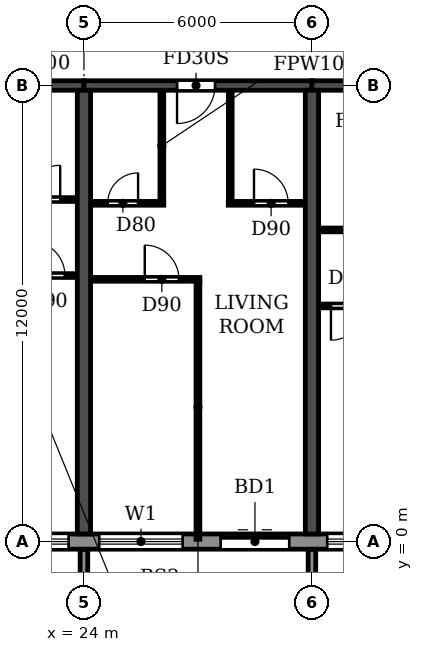
"""IFC4 building model, lengths in metres.
Left out: names, types, materials, properties, quantities, classifications, styles, units other than length and angle.
Written with IfcOpenShell. Run it as: python <this file> out.ifc"""

import sys

from ifc_helpers import new_model, si_unit, direction, frame, frame_2d, origin, place, context, subcontext, project, spatial, polyline, rectangle, outline, extrude, source, transform, mapped, element, fill, save


model = new_model("IFC4")
c1 = context("Model", 3, precision=1e-05, world=origin(), true_north=direction((0.0, 1.0)))
c2 = subcontext(c1, "Body", "Model", "MODEL_VIEW")
j1 = project(units=[si_unit("LENGTHUNIT", "METRE"), si_unit("PLANEANGLEUNIT", "RADIAN")], contexts=[c1])
p1 = place(None, origin())
s1 = spatial("IfcSite", under=j1, at=p1, CompositionType="ELEMENT")
p2 = place(p1, origin())
s2 = spatial("IfcBuilding", under=s1, at=p2, CompositionType="ELEMENT")
p3 = place(p2, frame((0.0, 0.0, 72.9)))
s3 = spatial("IfcBuildingStorey", under=s2, at=p3, CompositionType="ELEMENT", Elevation=72.9)
for number, where, z_axis, x_axis in (
    (1, (24.0, 0.2, 0.0), (0.0, 0.0, 1.0), (0.0, 1.0, 0.0)),
    (2, (30.0, 0.2, 0.0), (0.0, 0.0, 1.0), (0.0, 1.0, 0.0)),
):
    element("IfcWall", number, at=place(p3, frame(where, z_axis=z_axis, x_axis=x_axis)), inside=s3, PredefinedType="SHEAR", context=c2, shape_type="SweptSolid", body=[
        extrude(rectangle(XDim=11.675, YDim=0.35, at=frame_2d((5.837, 0.0))), origin(), (0.0, 0.0, 1.0), 3.06),
    ])
p4 = place(p3, frame((18.0, 12.0, 0.0), z_axis=(0.0, 0.0, 1.0), x_axis=(1.0, 0.0, 0.0)))
e3 = element("IfcWall", 3, at=p4, inside=s3, PredefinedType="SHEAR", context=c2, shape_type="SweptSolid", body=[
    extrude(rectangle(XDim=6.0, YDim=0.25, at=frame_2d((3.0, 0.0))), origin(), (0.0, 0.0, 1.0), 2.46),
])
p5 = place(p4, frame((2.45, 0.0, 0.0)))
e4 = element("IfcOpeningElement", 4, at=p5, cuts=e3, PredefinedType="OPENING", context=c2, shape_type="SweptSolid", body=[
    extrude(rectangle(XDim=1.0, YDim=2.1, at=frame_2d((0.5, 1.05))), frame((0.0, 0.135, 0.0), z_axis=(0.0, -1.0, 0.0), x_axis=(1.0, 0.0, 0.0)), (0.0, 0.0, 1.0), 0.27),
])
p6 = place(p3, frame((24.0, 12.0, 0.0), z_axis=(0.0, 0.0, 1.0), x_axis=(1.0, 0.0, 0.0)))
e5 = element("IfcWall", 5, at=p6, inside=s3, PredefinedType="SHEAR", context=c2, shape_type="SweptSolid", body=[
    extrude(rectangle(XDim=6.0, YDim=0.25, at=frame_2d((3.0, 0.0))), origin(), (0.0, 0.0, 1.0), 2.46),
])
p7 = place(p6, frame((2.45, 0.0, 0.0)))
e6 = element("IfcOpeningElement", 6, at=p7, cuts=e5, PredefinedType="OPENING", context=c2, shape_type="SweptSolid", body=[
    extrude(rectangle(XDim=1.0, YDim=2.1, at=frame_2d((0.5, 1.05))), frame((0.0, 0.135, 0.0), z_axis=(0.0, -1.0, 0.0), x_axis=(1.0, 0.0, 0.0)), (0.0, 0.0, 1.0), 0.27),
])
p8 = place(p3, frame((30.0, 12.0, 0.0), z_axis=(0.0, 0.0, 1.0), x_axis=(1.0, 0.0, 0.0)))
e7 = element("IfcWall", 7, at=p8, inside=s3, PredefinedType="SHEAR", context=c2, shape_type="SweptSolid", body=[
    extrude(rectangle(XDim=6.0, YDim=0.25, at=frame_2d((3.0, 0.0))), origin(), (0.0, 0.0, 1.0), 2.46),
])
p9 = place(p3, frame((10.683, 0.0, 0.0), z_axis=(0.0, 0.0, 1.0), x_axis=(1.0, 0.0, 0.0)))
e8 = element("IfcWall", 8, at=p9, inside=s3, PredefinedType="STANDARD", context=c2, shape_type="SweptSolid", body=[
    extrude(rectangle(XDim=80.634, YDim=0.4, at=frame_2d((40.317, 0.0))), origin(), (0.0, 0.0, 1.0), 3.06),
])
p10 = place(p9, frame((1.717, 0.0, 0.9)))
e9 = element("IfcOpeningElement", 9, at=p10, cuts=e8, PredefinedType="OPENING", context=c2, shape_type="SweptSolid", body=[
    extrude(rectangle(XDim=2.2, YDim=1.5, at=frame_2d((1.1, 0.75))), frame((0.0, 0.21, 0.0), z_axis=(0.0, -1.0, 0.0), x_axis=(1.0, 0.0, 0.0)), (0.0, 0.0, 1.0), 0.42),
])
p11 = place(p9, frame((4.917, 0.0, 0.0)))
e10 = element("IfcOpeningElement", 10, at=p11, cuts=e8, PredefinedType="OPENING", context=c2, shape_type="SweptSolid", body=[
    extrude(rectangle(XDim=1.8, YDim=2.4, at=frame_2d((0.9, 1.2))), frame((0.0, 0.21, 0.0), z_axis=(0.0, -1.0, 0.0), x_axis=(1.0, 0.0, 0.0)), (0.0, 0.0, 1.0), 0.42),
])
p12 = place(p9, frame((7.717, 0.0, 0.9)))
e11 = element("IfcOpeningElement", 11, at=p12, cuts=e8, PredefinedType="OPENING", context=c2, shape_type="SweptSolid", body=[
    extrude(rectangle(XDim=2.2, YDim=1.5, at=frame_2d((1.1, 0.75))), frame((0.0, 0.21, 0.0), z_axis=(0.0, -1.0, 0.0), x_axis=(1.0, 0.0, 0.0)), (0.0, 0.0, 1.0), 0.42),
])
p13 = place(p9, frame((10.717, 0.0, 0.9)))
e12 = element("IfcOpeningElement", 12, at=p13, cuts=e8, PredefinedType="OPENING", context=c2, shape_type="SweptSolid", body=[
    extrude(rectangle(XDim=2.2, YDim=1.5, at=frame_2d((1.1, 0.75))), frame((0.0, 0.21, 0.0), z_axis=(0.0, -1.0, 0.0), x_axis=(1.0, 0.0, 0.0)), (0.0, 0.0, 1.0), 0.42),
])
p14 = place(p9, frame((13.717, 0.0, 0.9)))
e13 = element("IfcOpeningElement", 13, at=p14, cuts=e8, PredefinedType="OPENING", context=c2, shape_type="SweptSolid", body=[
    extrude(rectangle(XDim=2.2, YDim=1.5, at=frame_2d((1.1, 0.75))), frame((0.0, 0.21, 0.0), z_axis=(0.0, -1.0, 0.0), x_axis=(1.0, 0.0, 0.0)), (0.0, 0.0, 1.0), 0.42),
])
p15 = place(p9, frame((16.917, 0.0, 0.0)))
e14 = element("IfcOpeningElement", 14, at=p15, cuts=e8, PredefinedType="OPENING", context=c2, shape_type="SweptSolid", body=[
    extrude(rectangle(XDim=1.8, YDim=2.4, at=frame_2d((0.9, 1.2))), frame((0.0, 0.21, 0.0), z_axis=(0.0, -1.0, 0.0), x_axis=(1.0, 0.0, 0.0)), (0.0, 0.0, 1.0), 0.42),
])
p16 = place(p9, frame((19.717, 0.0, 0.9)))
e15 = element("IfcOpeningElement", 15, at=p16, cuts=e8, PredefinedType="OPENING", context=c2, shape_type="SweptSolid", body=[
    extrude(rectangle(XDim=2.2, YDim=1.5, at=frame_2d((1.1, 0.75))), frame((0.0, 0.21, 0.0), z_axis=(0.0, -1.0, 0.0), x_axis=(1.0, 0.0, 0.0)), (0.0, 0.0, 1.0), 0.42),
])
p17 = place(p9, frame((22.717, 0.0, 0.9)))
e16 = element("IfcOpeningElement", 16, at=p17, cuts=e8, PredefinedType="OPENING", context=c2, shape_type="SweptSolid", body=[
    extrude(rectangle(XDim=2.2, YDim=1.5, at=frame_2d((1.1, 0.75))), frame((0.0, 0.21, 0.0), z_axis=(0.0, -1.0, 0.0), x_axis=(1.0, 0.0, 0.0)), (0.0, 0.0, 1.0), 0.42),
])
p18 = place(p9, frame((25.917, 0.0, 0.0)))
e17 = element("IfcOpeningElement", 17, at=p18, cuts=e8, PredefinedType="OPENING", context=c2, shape_type="SweptSolid", body=[
    extrude(rectangle(XDim=1.8, YDim=2.4, at=frame_2d((0.9, 1.2))), frame((0.0, 0.21, 0.0), z_axis=(0.0, -1.0, 0.0), x_axis=(1.0, 0.0, 0.0)), (0.0, 0.0, 1.0), 0.42),
])
p19 = place(p9, frame((28.717, 0.0, 0.9)))
e18 = element("IfcOpeningElement", 18, at=p19, cuts=e8, PredefinedType="OPENING", context=c2, shape_type="SweptSolid", body=[
    extrude(rectangle(XDim=2.2, YDim=1.5, at=frame_2d((1.1, 0.75))), frame((0.0, 0.21, 0.0), z_axis=(0.0, -1.0, 0.0), x_axis=(1.0, 0.0, 0.0)), (0.0, 0.0, 1.0), 0.42),
])
p20 = place(p9, frame((31.717, 0.0, 0.9)))
e19 = element("IfcOpeningElement", 19, at=p20, cuts=e8, PredefinedType="OPENING", context=c2, shape_type="SweptSolid", body=[
    extrude(rectangle(XDim=2.2, YDim=1.5, at=frame_2d((1.1, 0.75))), frame((0.0, 0.21, 0.0), z_axis=(0.0, -1.0, 0.0), x_axis=(1.0, 0.0, 0.0)), (0.0, 0.0, 1.0), 0.42),
])
p21 = place(p9, frame((34.717, 0.0, 0.9)))
e20 = element("IfcOpeningElement", 20, at=p21, cuts=e8, PredefinedType="OPENING", context=c2, shape_type="SweptSolid", body=[
    extrude(rectangle(XDim=2.2, YDim=1.5, at=frame_2d((1.1, 0.75))), frame((0.0, 0.21, 0.0), z_axis=(0.0, -1.0, 0.0), x_axis=(1.0, 0.0, 0.0)), (0.0, 0.0, 1.0), 0.42),
])
p22 = place(p9, frame((37.917, 0.0, 0.0)))
e21 = element("IfcOpeningElement", 21, at=p22, cuts=e8, PredefinedType="OPENING", context=c2, shape_type="SweptSolid", body=[
    extrude(rectangle(XDim=1.8, YDim=2.4, at=frame_2d((0.9, 1.2))), frame((0.0, 0.21, 0.0), z_axis=(0.0, -1.0, 0.0), x_axis=(1.0, 0.0, 0.0)), (0.0, 0.0, 1.0), 0.42),
])
p23 = place(p9, frame((40.717, 0.0, 0.9)))
e22 = element("IfcOpeningElement", 22, at=p23, cuts=e8, PredefinedType="OPENING", context=c2, shape_type="SweptSolid", body=[
    extrude(rectangle(XDim=2.2, YDim=1.5, at=frame_2d((1.1, 0.75))), frame((0.0, 0.21, 0.0), z_axis=(0.0, -1.0, 0.0), x_axis=(1.0, 0.0, 0.0)), (0.0, 0.0, 1.0), 0.42),
])
p24 = place(p9, frame((43.717, 0.0, 0.9)))
e23 = element("IfcOpeningElement", 23, at=p24, cuts=e8, PredefinedType="OPENING", context=c2, shape_type="SweptSolid", body=[
    extrude(rectangle(XDim=2.2, YDim=1.5, at=frame_2d((1.1, 0.75))), frame((0.0, 0.21, 0.0), z_axis=(0.0, -1.0, 0.0), x_axis=(1.0, 0.0, 0.0)), (0.0, 0.0, 1.0), 0.42),
])
p25 = place(p9, frame((46.717, 0.0, 0.9)))
e24 = element("IfcOpeningElement", 24, at=p25, cuts=e8, PredefinedType="OPENING", context=c2, shape_type="SweptSolid", body=[
    extrude(rectangle(XDim=2.2, YDim=1.5, at=frame_2d((1.1, 0.75))), frame((0.0, 0.21, 0.0), z_axis=(0.0, -1.0, 0.0), x_axis=(1.0, 0.0, 0.0)), (0.0, 0.0, 1.0), 0.42),
])
p26 = place(p9, frame((49.917, 0.0, 0.0)))
e25 = element("IfcOpeningElement", 25, at=p26, cuts=e8, PredefinedType="OPENING", context=c2, shape_type="SweptSolid", body=[
    extrude(rectangle(XDim=1.8, YDim=2.4, at=frame_2d((0.9, 1.2))), frame((0.0, 0.21, 0.0), z_axis=(0.0, -1.0, 0.0), x_axis=(1.0, 0.0, 0.0)), (0.0, 0.0, 1.0), 0.42),
])
p27 = place(p9, frame((52.717, 0.0, 0.9)))
e26 = element("IfcOpeningElement", 26, at=p27, cuts=e8, PredefinedType="OPENING", context=c2, shape_type="SweptSolid", body=[
    extrude(rectangle(XDim=2.2, YDim=1.5, at=frame_2d((1.1, 0.75))), frame((0.0, 0.21, 0.0), z_axis=(0.0, -1.0, 0.0), x_axis=(1.0, 0.0, 0.0)), (0.0, 0.0, 1.0), 0.42),
])
p28 = place(p9, frame((55.717, 0.0, 0.9)))
e27 = element("IfcOpeningElement", 27, at=p28, cuts=e8, PredefinedType="OPENING", context=c2, shape_type="SweptSolid", body=[
    extrude(rectangle(XDim=2.2, YDim=1.5, at=frame_2d((1.1, 0.75))), frame((0.0, 0.21, 0.0), z_axis=(0.0, -1.0, 0.0), x_axis=(1.0, 0.0, 0.0)), (0.0, 0.0, 1.0), 0.42),
])
p29 = place(p9, frame((58.717, 0.0, 0.9)))
e28 = element("IfcOpeningElement", 28, at=p29, cuts=e8, PredefinedType="OPENING", context=c2, shape_type="SweptSolid", body=[
    extrude(rectangle(XDim=2.2, YDim=1.5, at=frame_2d((1.1, 0.75))), frame((0.0, 0.21, 0.0), z_axis=(0.0, -1.0, 0.0), x_axis=(1.0, 0.0, 0.0)), (0.0, 0.0, 1.0), 0.42),
])
p30 = place(p9, frame((61.717, 0.0, 0.9)))
e29 = element("IfcOpeningElement", 29, at=p30, cuts=e8, PredefinedType="OPENING", context=c2, shape_type="SweptSolid", body=[
    extrude(rectangle(XDim=2.2, YDim=1.5, at=frame_2d((1.1, 0.75))), frame((0.0, 0.21, 0.0), z_axis=(0.0, -1.0, 0.0), x_axis=(1.0, 0.0, 0.0)), (0.0, 0.0, 1.0), 0.42),
])
p31 = place(p9, frame((64.917, 0.0, 0.0)))
e30 = element("IfcOpeningElement", 30, at=p31, cuts=e8, PredefinedType="OPENING", context=c2, shape_type="SweptSolid", body=[
    extrude(rectangle(XDim=1.8, YDim=2.4, at=frame_2d((0.9, 1.2))), frame((0.0, 0.21, 0.0), z_axis=(0.0, -1.0, 0.0), x_axis=(1.0, 0.0, 0.0)), (0.0, 0.0, 1.0), 0.42),
])
p32 = place(p9, frame((67.717, 0.0, 0.9)))
e31 = element("IfcOpeningElement", 31, at=p32, cuts=e8, PredefinedType="OPENING", context=c2, shape_type="SweptSolid", body=[
    extrude(rectangle(XDim=2.2, YDim=1.5, at=frame_2d((1.1, 0.75))), frame((0.0, 0.21, 0.0), z_axis=(0.0, -1.0, 0.0), x_axis=(1.0, 0.0, 0.0)), (0.0, 0.0, 1.0), 0.42),
])
p33 = place(p9, frame((70.717, 0.0, 0.9)))
e32 = element("IfcOpeningElement", 32, at=p33, cuts=e8, PredefinedType="OPENING", context=c2, shape_type="SweptSolid", body=[
    extrude(rectangle(XDim=2.2, YDim=1.5, at=frame_2d((1.1, 0.75))), frame((0.0, 0.21, 0.0), z_axis=(0.0, -1.0, 0.0), x_axis=(1.0, 0.0, 0.0)), (0.0, 0.0, 1.0), 0.42),
])
p34 = place(p9, frame((73.917, 0.0, 0.0)))
e33 = element("IfcOpeningElement", 33, at=p34, cuts=e8, PredefinedType="OPENING", context=c2, shape_type="SweptSolid", body=[
    extrude(rectangle(XDim=1.8, YDim=2.4, at=frame_2d((0.9, 1.2))), frame((0.0, 0.21, 0.0), z_axis=(0.0, -1.0, 0.0), x_axis=(1.0, 0.0, 0.0)), (0.0, 0.0, 1.0), 0.42),
])
p35 = place(p9, frame((76.717, 0.0, 0.9)))
e34 = element("IfcOpeningElement", 34, at=p35, cuts=e8, PredefinedType="OPENING", context=c2, shape_type="SweptSolid", body=[
    extrude(rectangle(XDim=2.2, YDim=1.5, at=frame_2d((1.1, 0.75))), frame((0.0, 0.21, 0.0), z_axis=(0.0, -1.0, 0.0), x_axis=(1.0, 0.0, 0.0)), (0.0, 0.0, 1.0), 0.42),
])
m1 = source(origin(), c2, "Body", "SweptSolid", [
    extrude(outline(polyline([(0.0, 0.0), (0.2, 0.0), (0.2, 1.65), (0.0, 1.65), (0.0, 0.0)])), origin(), (0.0, 0.0, 1.0), 3.1),
])
for number, where in (
    (35, (23.9, -1.85, 0.0)),
    (36, (29.9, -1.85, 0.0)),
):
    element("IfcWall", number, at=place(p3, frame(where)), inside=s3, PredefinedType="STANDARD", context=c2, shape_type="MappedRepresentation", body=[
        mapped(m1, transform((0.0, 0.0, 0.0))),
    ])
p36 = place(p3, frame((30.185, 6.2, 0.0), z_axis=(0.0, 0.0, 1.0), x_axis=(1.0, 0.0, 0.0)))
e37 = element("IfcWall", 37, at=p36, inside=s3, PredefinedType="PARTITIONING", context=c2, shape_type="SweptSolid", body=[
    extrude(rectangle(XDim=5.63, YDim=0.1, at=frame_2d((2.815, 0.0))), origin(), (0.0, 0.0, 1.0), 3.06),
])
p37 = place(p36, frame((0.315, 0.0, 0.0)))
e38 = element("IfcOpeningElement", 38, at=p37, cuts=e37, PredefinedType="OPENING", context=c2, shape_type="SweptSolid", body=[
    extrude(rectangle(XDim=0.9, YDim=2.1, at=frame_2d((0.45, 1.05))), frame((0.0, 0.06, 0.0), z_axis=(0.0, -1.0, 0.0), x_axis=(1.0, 0.0, 0.0)), (0.0, 0.0, 1.0), 0.12),
])
p38 = place(p36, frame((4.415, 0.0, 0.0)))
e39 = element("IfcOpeningElement", 39, at=p38, cuts=e37, PredefinedType="OPENING", context=c2, shape_type="SweptSolid", body=[
    extrude(rectangle(XDim=0.9, YDim=2.1, at=frame_2d((0.45, 1.05))), frame((0.0, 0.06, 0.0), z_axis=(0.0, -1.0, 0.0), x_axis=(1.0, 0.0, 0.0)), (0.0, 0.0, 1.0), 0.12),
])
p39 = place(p3, frame((24.185, 6.9, 0.0), z_axis=(0.0, 0.0, 1.0), x_axis=(1.0, 0.0, 0.0)))
e40 = element("IfcWall", 40, at=p39, inside=s3, PredefinedType="PARTITIONING", context=c2, shape_type="SweptSolid", body=[
    extrude(rectangle(XDim=2.865, YDim=0.1, at=frame_2d((1.433, 0.0))), origin(), (0.0, 0.0, 1.0), 3.06),
])
p40 = place(p39, frame((1.415, 0.0, 0.0)))
e41 = element("IfcOpeningElement", 41, at=p40, cuts=e40, PredefinedType="OPENING", context=c2, shape_type="SweptSolid", body=[
    extrude(rectangle(XDim=0.9, YDim=2.1, at=frame_2d((0.45, 1.05))), frame((0.0, 0.06, 0.0), z_axis=(0.0, -1.0, 0.0), x_axis=(1.0, 0.0, 0.0)), (0.0, 0.0, 1.0), 0.12),
])
p41 = place(p3, frame((20.95, 7.0, 0.0), z_axis=(0.0, 0.0, 1.0), x_axis=(1.0, 0.0, 0.0)))
e42 = element("IfcWall", 42, at=p41, inside=s3, PredefinedType="PARTITIONING", context=c2, shape_type="SweptSolid", body=[
    extrude(rectangle(XDim=2.865, YDim=0.1, at=frame_2d((1.433, 0.0))), origin(), (0.0, 0.0, 1.0), 3.06),
])
p42 = place(p41, frame((1.65, 0.0, 0.0)))
e43 = element("IfcOpeningElement", 43, at=p42, cuts=e42, PredefinedType="OPENING", context=c2, shape_type="SweptSolid", body=[
    extrude(rectangle(XDim=0.9, YDim=2.1, at=frame_2d((0.45, 1.05))), frame((0.0, 0.06, 0.0), z_axis=(0.0, -1.0, 0.0), x_axis=(1.0, 0.0, 0.0)), (0.0, 0.0, 1.0), 0.12),
])
p43 = place(p3, frame((30.185, 8.2, 0.0), z_axis=(0.0, 0.0, 1.0), x_axis=(1.0, 0.0, 0.0)))
e44 = element("IfcWall", 44, at=p43, inside=s3, PredefinedType="PARTITIONING", context=c2, shape_type="SweptSolid", body=[
    extrude(rectangle(XDim=3.165, YDim=0.1, at=frame_2d((1.583, 0.0))), origin(), (0.0, 0.0, 1.0), 3.06),
])
p44 = place(p43, frame((1.065, 0.0, 0.0)))
e45 = element("IfcOpeningElement", 45, at=p44, cuts=e44, PredefinedType="OPENING", context=c2, shape_type="SweptSolid", body=[
    extrude(rectangle(XDim=0.8, YDim=2.1, at=frame_2d((0.4, 1.05))), frame((0.0, 0.06, 0.0), z_axis=(0.0, -1.0, 0.0), x_axis=(1.0, 0.0, 0.0)), (0.0, 0.0, 1.0), 0.12),
])
p45 = place(p3, frame((24.185, 8.9, 0.0), z_axis=(0.0, 0.0, 1.0), x_axis=(1.0, 0.0, 0.0)))
e46 = element("IfcWall", 46, at=p45, inside=s3, PredefinedType="PARTITIONING", context=c2, shape_type="SweptSolid", body=[
    extrude(rectangle(XDim=1.915, YDim=0.1, at=frame_2d((0.958, 0.0))), origin(), (0.0, 0.0, 1.0), 3.06),
])
p46 = place(p45, frame((0.44, 0.0, 0.0)))
e47 = element("IfcOpeningElement", 47, at=p46, cuts=e46, PredefinedType="OPENING", context=c2, shape_type="SweptSolid", body=[
    extrude(rectangle(XDim=0.8, YDim=2.1, at=frame_2d((0.4, 1.05))), frame((0.0, 0.06, 0.0), z_axis=(0.0, -1.0, 0.0), x_axis=(1.0, 0.0, 0.0)), (0.0, 0.0, 1.0), 0.12),
])
p47 = place(p3, frame((27.8, 8.9, 0.0), z_axis=(0.0, 0.0, 1.0), x_axis=(1.0, 0.0, 0.0)))
e48 = element("IfcWall", 48, at=p47, inside=s3, PredefinedType="PARTITIONING", context=c2, shape_type="SweptSolid", body=[
    extrude(rectangle(XDim=2.015, YDim=0.1, at=frame_2d((1.007, 0.0))), origin(), (0.0, 0.0, 1.0), 3.06),
])
p48 = place(p47, frame((0.675, 0.0, 0.0)))
e49 = element("IfcOpeningElement", 49, at=p48, cuts=e48, PredefinedType="OPENING", context=c2, shape_type="SweptSolid", body=[
    extrude(rectangle(XDim=0.9, YDim=2.1, at=frame_2d((0.45, 1.05))), frame((0.0, 0.06, 0.0), z_axis=(0.0, -1.0, 0.0), x_axis=(1.0, 0.0, 0.0)), (0.0, 0.0, 1.0), 0.12),
])
p49 = place(p3, frame((21.8, 9.0, 0.0), z_axis=(0.0, 0.0, 1.0), x_axis=(1.0, 0.0, 0.0)))
e50 = element("IfcWall", 50, at=p49, inside=s3, PredefinedType="PARTITIONING", context=c2, shape_type="SweptSolid", body=[
    extrude(rectangle(XDim=2.015, YDim=0.1, at=frame_2d((1.007, 0.0))), origin(), (0.0, 0.0, 1.0), 3.06),
])
p50 = place(p49, frame((0.675, 0.0, 0.0)))
e51 = element("IfcOpeningElement", 51, at=p50, cuts=e50, PredefinedType="OPENING", context=c2, shape_type="SweptSolid", body=[
    extrude(rectangle(XDim=0.9, YDim=2.1, at=frame_2d((0.45, 1.05))), frame((0.0, 0.06, 0.0), z_axis=(0.0, -1.0, 0.0), x_axis=(1.0, 0.0, 0.0)), (0.0, 0.0, 1.0), 0.12),
])
p51 = place(p3, frame((26.05, 8.95, 0.0), z_axis=(0.0, 0.0, 1.0), x_axis=(0.0, 1.0, 0.0)))
e52 = element("IfcWall", 52, at=p51, inside=s3, PredefinedType="PARTITIONING", context=c2, shape_type="SweptSolid", body=[
    extrude(rectangle(XDim=2.915, YDim=0.1, at=frame_2d((1.458, 0.0))), origin(), (0.0, 0.0, 1.0), 3.06),
])
p52 = place(p3, frame((27.0, 0.06, 0.0), z_axis=(0.0, 0.0, 1.0), x_axis=(0.0, 1.0, 0.0)))
e53 = element("IfcWall", 53, at=p52, inside=s3, PredefinedType="PARTITIONING", context=c2, shape_type="SweptSolid", body=[
    extrude(rectangle(XDim=6.79, YDim=0.1, at=frame_2d((3.395, 0.0))), origin(), (0.0, 0.0, 1.0), 3.06),
])
p53 = place(p3, frame((27.85, 8.95, 0.0), z_axis=(0.0, 0.0, 1.0), x_axis=(0.0, 1.0, 0.0)))
e54 = element("IfcWall", 54, at=p53, inside=s3, PredefinedType="PARTITIONING", context=c2, shape_type="SweptSolid", body=[
    extrude(rectangle(XDim=2.915, YDim=0.1, at=frame_2d((1.458, 0.0))), origin(), (0.0, 0.0, 1.0), 3.06),
])
p54 = place(p13, origin())
e55 = element("IfcWindow", 55, at=p54, inside=s3, PartitioningType="DOUBLE_PANEL_HORIZONTAL", PredefinedType="WINDOW", context=c2, shape_type="SweptSolid", body=[
    extrude(rectangle(XDim=2.2, YDim=1.5, at=frame_2d((1.1, 0.75))), frame((0.0, 0.03, 0.0), z_axis=(0.0, -1.0, 0.0), x_axis=(1.0, 0.0, 0.0)), (0.0, 0.0, 1.0), 0.06),
])
fill(e12, e55)
p55 = place(p14, origin())
e56 = element("IfcWindow", 56, at=p55, inside=s3, PartitioningType="DOUBLE_PANEL_HORIZONTAL", PredefinedType="WINDOW", context=c2, shape_type="SweptSolid", body=[
    extrude(rectangle(XDim=2.2, YDim=1.5, at=frame_2d((1.1, 0.75))), frame((0.0, 0.03, 0.0), z_axis=(0.0, -1.0, 0.0), x_axis=(1.0, 0.0, 0.0)), (0.0, 0.0, 1.0), 0.06),
])
fill(e13, e56)
p56 = place(p15, origin())
e57 = element("IfcDoor", 57, at=p56, inside=s3, OperationType="DOUBLE_DOOR_SLIDING", PredefinedType="DOOR", context=c2, shape_type="SweptSolid", body=[
    extrude(rectangle(XDim=1.8, YDim=2.4, at=frame_2d((0.9, 1.2))), frame((0.0, 0.025, 0.0), z_axis=(0.0, -1.0, 0.0), x_axis=(1.0, 0.0, 0.0)), (0.0, 0.0, 1.0), 0.05),
])
fill(e14, e57)
p57 = place(p16, origin())
e58 = element("IfcWindow", 58, at=p57, inside=s3, PartitioningType="DOUBLE_PANEL_HORIZONTAL", PredefinedType="WINDOW", context=c2, shape_type="SweptSolid", body=[
    extrude(rectangle(XDim=2.2, YDim=1.5, at=frame_2d((1.1, 0.75))), frame((0.0, 0.03, 0.0), z_axis=(0.0, -1.0, 0.0), x_axis=(1.0, 0.0, 0.0)), (0.0, 0.0, 1.0), 0.06),
])
fill(e15, e58)
p58 = place(p50, origin())
e59 = element("IfcDoor", 59, at=p58, inside=s3, OperationType="SINGLE_SWING_RIGHT", PredefinedType="DOOR", context=c2, shape_type="SweptSolid", body=[
    extrude(rectangle(XDim=0.9, YDim=2.1, at=frame_2d((0.45, 1.05))), frame((0.0, 0.025, 0.0), z_axis=(0.0, -1.0, 0.0), x_axis=(1.0, 0.0, 0.0)), (0.0, 0.0, 1.0), 0.05),
])
fill(e51, e59)
p59 = place(p42, origin())
e60 = element("IfcDoor", 60, at=p59, inside=s3, OperationType="SINGLE_SWING_LEFT", PredefinedType="DOOR", context=c2, shape_type="SweptSolid", body=[
    extrude(rectangle(XDim=0.9, YDim=2.1, at=frame_2d((0.45, 1.05))), frame((0.0, 0.025, 0.0), z_axis=(0.0, -1.0, 0.0), x_axis=(1.0, 0.0, 0.0)), (0.0, 0.0, 1.0), 0.05),
])
fill(e43, e60)
p60 = place(p46, origin())
e61 = element("IfcDoor", 61, at=p60, inside=s3, OperationType="SINGLE_SWING_RIGHT", PredefinedType="DOOR", context=c2, shape_type="SweptSolid", body=[
    extrude(rectangle(XDim=0.8, YDim=2.1, at=frame_2d((0.4, 1.05))), frame((0.0, 0.025, 0.0), z_axis=(0.0, -1.0, 0.0), x_axis=(1.0, 0.0, 0.0)), (0.0, 0.0, 1.0), 0.05),
])
fill(e47, e61)
p61 = place(p40, origin())
e62 = element("IfcDoor", 62, at=p61, inside=s3, OperationType="SINGLE_SWING_LEFT", PredefinedType="DOOR", context=c2, shape_type="SweptSolid", body=[
    extrude(rectangle(XDim=0.9, YDim=2.1, at=frame_2d((0.45, 1.05))), frame((0.0, 0.025, 0.0), z_axis=(0.0, -1.0, 0.0), x_axis=(1.0, 0.0, 0.0)), (0.0, 0.0, 1.0), 0.05),
])
fill(e41, e62)
p62 = place(p7, frame((1.0, 0.0, 0.0), z_axis=(0.0, 0.0, 1.0), x_axis=(-1.0, 0.0, 0.0)))
e63 = element("IfcDoor", 63, at=p62, inside=s3, OperationType="SINGLE_SWING_RIGHT", PredefinedType="DOOR", context=c2, shape_type="SweptSolid", body=[
    extrude(rectangle(XDim=1.0, YDim=2.1, at=frame_2d((0.5, 1.05))), frame((0.0, 0.025, 0.0), z_axis=(0.0, -1.0, 0.0), x_axis=(1.0, 0.0, 0.0)), (0.0, 0.0, 1.0), 0.05),
])
fill(e6, e63)
p63 = place(p48, origin())
e64 = element("IfcDoor", 64, at=p63, inside=s3, OperationType="SINGLE_SWING_LEFT", PredefinedType="DOOR", context=c2, shape_type="SweptSolid", body=[
    extrude(rectangle(XDim=0.9, YDim=2.1, at=frame_2d((0.45, 1.05))), frame((0.0, 0.025, 0.0), z_axis=(0.0, -1.0, 0.0), x_axis=(1.0, 0.0, 0.0)), (0.0, 0.0, 1.0), 0.05),
])
fill(e49, e64)
p64 = place(p37, frame((0.9, 0.0, 0.0), z_axis=(0.0, 0.0, 1.0), x_axis=(-1.0, 0.0, 0.0)))
e65 = element("IfcDoor", 65, at=p64, inside=s3, OperationType="SINGLE_SWING_RIGHT", PredefinedType="DOOR", context=c2, shape_type="SweptSolid", body=[
    extrude(rectangle(XDim=0.9, YDim=2.1, at=frame_2d((0.45, 1.05))), frame((0.0, 0.025, 0.0), z_axis=(0.0, -1.0, 0.0), x_axis=(1.0, 0.0, 0.0)), (0.0, 0.0, 1.0), 0.05),
])
fill(e38, e65)
save(model, sys.argv[1])
